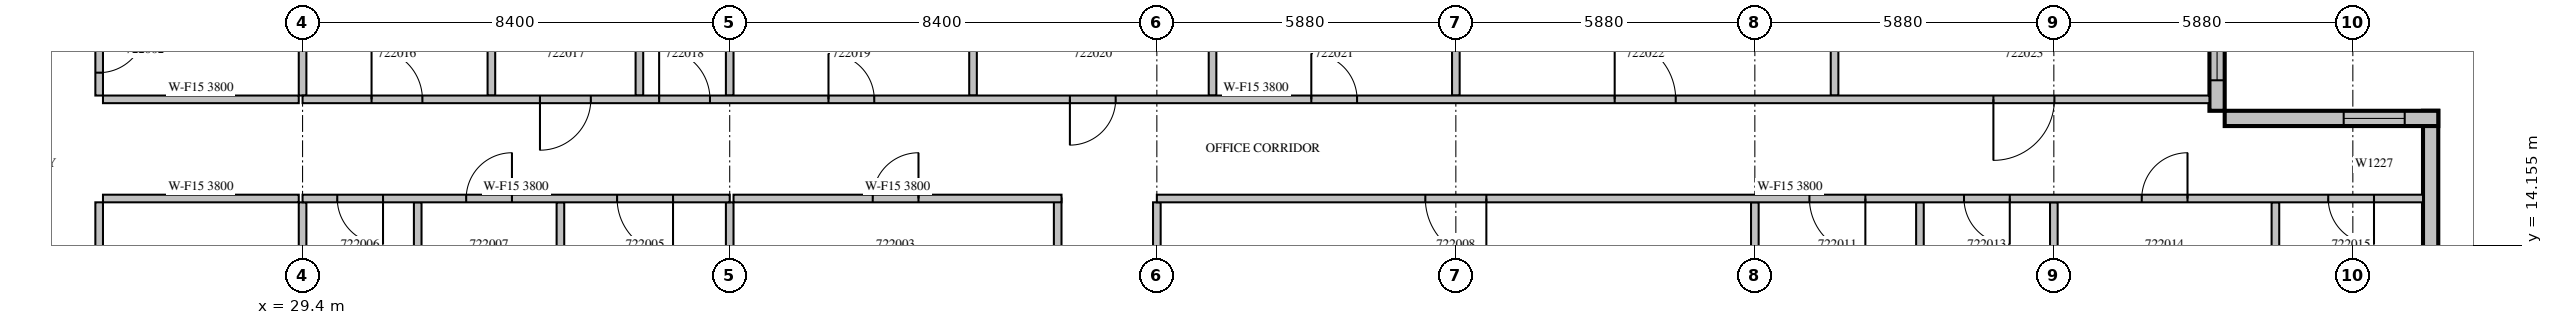
"""IFC4 building model, lengths in metres.
Left out: names, types, materials, properties, quantities, classifications, styles, units other than length and angle.
Written with IfcOpenShell. Run it as: python <this file> out.ifc"""

import sys

from ifc_helpers import new_model, si_unit, direction, frame, frame_2d, origin, place, context, subcontext, project, spatial, rectangle, extrude, source, transform, mapped, element, fill, save


model = new_model("IFC4")
c1 = context("Model", 3, precision=1e-05, world=origin(), true_north=direction((0.0, 1.0)))
c2 = subcontext(c1, "Body", "Model", "MODEL_VIEW")
j1 = project(units=[si_unit("LENGTHUNIT", "METRE"), si_unit("PLANEANGLEUNIT", "RADIAN")], contexts=[c1])
p1 = place(None, origin())
s1 = spatial("IfcSite", under=j1, at=p1, CompositionType="ELEMENT")
p2 = place(p1, origin())
s2 = spatial("IfcBuilding", under=s1, at=p2, CompositionType="ELEMENT")
p3 = place(p2, frame((0.0, 0.0, 103.5)))
s3 = spatial("IfcBuildingStorey", under=s2, at=p3, CompositionType="ELEMENT", Elevation=103.5)
m1 = source(origin(), c2, "Body", "SweptSolid", [
    extrude(rectangle(XDim=6.3, YDim=0.3, at=frame_2d((3.15, 0.0))), origin(), (0.0, 0.0, 1.0), 3.8),
])
p4 = place(p3, frame((71.25, 10.5, 0.0), z_axis=(0.0, 0.0, 1.0), x_axis=(0.0, 1.0, 0.0)))
e1 = element("IfcWall", 1, at=p4, inside=s3, PredefinedType="STANDARD", context=c2, shape_type="MappedRepresentation", body=[
    mapped(m1, transform((0.0, 0.0, 0.0), scale=1.0)),
])
m2 = source(origin(), c2, "Body", "SweptSolid", [
    extrude(rectangle(XDim=1.2, YDim=2.7, at=frame_2d((0.6, 1.35))), frame((0.0, 0.16, 0.0), z_axis=(0.0, -1.0, 0.0), x_axis=(1.0, 0.0, 0.0)), (0.0, 0.0, 1.0), 0.32),
])
p5 = place(p4, frame((1.025, 0.0, 0.6)))
e2 = element("IfcOpeningElement", 2, at=p5, cuts=e1, PredefinedType="OPENING", context=c2, shape_type="MappedRepresentation", body=[
    mapped(m2, transform((0.0, 0.0, 0.0), scale=1.0)),
])
m3 = source(origin(), c2, "Body", "SweptSolid", [
    extrude(rectangle(XDim=4.2, YDim=0.3, at=frame_2d((2.1, 0.0))), origin(), (0.0, 0.0, 1.0), 3.8),
])
p6 = place(p3, frame((71.4, 16.65, 0.0), z_axis=(0.0, 0.0, 1.0), x_axis=(-1.0, 0.0, 0.0)))
e3 = element("IfcWall", 3, at=p6, inside=s3, PredefinedType="STANDARD", context=c2, shape_type="MappedRepresentation", body=[
    mapped(m3, transform((0.0, 0.0, 0.0), scale=1.0)),
])
p7 = place(p6, frame((0.66, 0.0, 0.6)))
e4 = element("IfcOpeningElement", 4, at=p7, cuts=e3, PredefinedType="OPENING", context=c2, shape_type="MappedRepresentation", body=[
    mapped(m2, transform((0.0, 0.0, 0.0), scale=1.0)),
])
p8 = place(p3, frame((67.05, 16.8, 0.0), z_axis=(0.0, 0.0, 1.0), x_axis=(0.0, 1.0, 0.0)))
e5 = element("IfcWall", 5, at=p8, inside=s3, PredefinedType="STANDARD", context=c2, shape_type="MappedRepresentation", body=[
    mapped(m3, transform((0.0, 0.0, 0.0), scale=1.0)),
])
m4 = source(origin(), c2, "Body", "SweptSolid", [
    extrude(rectangle(XDim=3.0, YDim=2.7, at=frame_2d((1.5, 1.35))), frame((0.0, 0.16, 0.0), z_axis=(0.0, -1.0, 0.0), x_axis=(1.0, 0.0, 0.0)), (0.0, 0.0, 1.0), 0.32),
])
p9 = place(p8, frame((0.6, 0.0, 0.6)))
e6 = element("IfcOpeningElement", 6, at=p9, cuts=e5, PredefinedType="OPENING", context=c2, shape_type="MappedRepresentation", body=[
    mapped(m4, transform((0.0, 0.0, 0.0), scale=1.0)),
])
m5 = source(origin(), c2, "Body", "SweptSolid", [
    extrude(rectangle(XDim=4.295, YDim=0.15, at=frame_2d((2.147, 0.0))), origin(), (0.0, 0.0, 1.0), 3.8),
])
p10 = place(p3, frame((25.4, 15.0, 0.0), z_axis=(0.0, 0.0, 1.0), x_axis=(0.0, -1.0, 0.0)))
e7 = element("IfcWall", 7, at=p10, inside=s3, PredefinedType="PARTITIONING", context=c2, shape_type="MappedRepresentation", body=[
    mapped(m5, transform((0.0, 0.0, 0.0), scale=1.0)),
])
m6 = source(origin(), c2, "Body", "SweptSolid", [
    extrude(rectangle(XDim=0.9, YDim=2.1, at=frame_2d((0.45, 1.05))), frame((0.0, 0.085, 0.0), z_axis=(0.0, -1.0, 0.0), x_axis=(1.0, 0.0, 0.0)), (0.0, 0.0, 1.0), 0.17),
])
p11 = place(p10, frame((1.113, 0.0, 0.0)))
e8 = element("IfcOpeningElement", 8, at=p11, cuts=e7, PredefinedType="OPENING", context=c2, shape_type="MappedRepresentation", body=[
    mapped(m6, transform((0.0, 0.0, 0.0), scale=1.0)),
])
m7 = source(origin(), c2, "Body", "SweptSolid", [
    extrude(rectangle(XDim=3.6, YDim=0.15, at=frame_2d((1.8, 0.0))), origin(), (0.0, 0.0, 1.0), 3.8),
])
p12 = place(p3, frame((25.4, 20.7, 0.0), z_axis=(0.0, 0.0, 1.0), x_axis=(0.0, -1.0, 0.0)))
e9 = element("IfcWall", 9, at=p12, inside=s3, PredefinedType="PARTITIONING", context=c2, shape_type="MappedRepresentation", body=[
    mapped(m7, transform((0.0, 0.0, 0.0), scale=1.0)),
])
p13 = place(p12, frame((2.25, 0.0, 0.0)))
e10 = element("IfcOpeningElement", 10, at=p13, cuts=e9, PredefinedType="OPENING", context=c2, shape_type="MappedRepresentation", body=[
    mapped(m6, transform((0.0, 0.0, 0.0), scale=1.0)),
])
p14 = place(p3, frame((29.325, 15.075, 0.0), z_axis=(0.0, 0.0, 1.0), x_axis=(-1.0, 0.0, 0.0)))
e11 = element("IfcWall", 11, at=p14, inside=s3, PredefinedType="PARTITIONING", context=c2, shape_type="SweptSolid", body=[
    extrude(rectangle(XDim=3.85, YDim=0.15, at=frame_2d((1.925, 0.0))), origin(), (0.0, 0.0, 1.0), 3.8),
])
m8 = source(origin(), c2, "Body", "SweptSolid", [
    extrude(rectangle(XDim=3.85, YDim=0.15, at=frame_2d((1.925, 0.0))), origin(), (0.0, 0.0, 1.0), 3.8),
])
p15 = place(p3, frame((25.475, 17.025, 0.0), z_axis=(0.0, 0.0, 1.0), x_axis=(1.0, 0.0, 0.0)))
e12 = element("IfcWall", 12, at=p15, inside=s3, PredefinedType="PARTITIONING", context=c2, shape_type="MappedRepresentation", body=[
    mapped(m8, transform((0.0, 0.0, 0.0), scale=1.0)),
])
p16 = place(p3, frame((29.4, 11.024, 0.0), z_axis=(0.0, 0.0, 1.0), x_axis=(0.0, 1.0, 0.0)))
e13 = element("IfcWall", 13, at=p16, inside=s3, PredefinedType="PARTITIONING", context=c2, shape_type="SweptSolid", body=[
    extrude(rectangle(XDim=3.976, YDim=0.15, at=frame_2d((1.988, 0.0))), origin(), (0.0, 0.0, 1.0), 3.8),
])
p17 = place(p3, frame((29.4, 17.1, 0.0), z_axis=(0.0, 0.0, 1.0), x_axis=(0.0, 1.0, 0.0)))
e14 = element("IfcWall", 14, at=p17, inside=s3, PredefinedType="PARTITIONING", context=c2, shape_type="SweptSolid", body=[
    extrude(rectangle(XDim=2.851, YDim=0.15, at=frame_2d((1.425, 0.0))), origin(), (0.0, 0.0, 1.0), 3.8),
])
m9 = source(origin(), c2, "Body", "SweptSolid", [
    extrude(rectangle(XDim=2.775, YDim=0.15, at=frame_2d((1.387, 0.0))), origin(), (0.0, 0.0, 1.0), 3.8),
])
p18 = place(p3, frame((44.25, 12.3, 0.0), z_axis=(0.0, 0.0, 1.0), x_axis=(0.0, 1.0, 0.0)))
e15 = element("IfcWall", 15, at=p18, inside=s3, PredefinedType="PARTITIONING", context=c2, shape_type="MappedRepresentation", body=[
    mapped(m9, transform((0.0, 0.0, 0.0), scale=1.0)),
])
m10 = source(origin(), c2, "Body", "SweptSolid", [
    extrude(rectangle(XDim=6.45, YDim=0.15, at=frame_2d((3.225, 0.0))), origin(), (0.0, 0.0, 1.0), 3.8),
])
p19 = place(p3, frame((44.325, 15.075, 0.0), z_axis=(0.0, 0.0, 1.0), x_axis=(-1.0, 0.0, 0.0)))
e16 = element("IfcWall", 16, at=p19, inside=s3, PredefinedType="PARTITIONING", context=c2, shape_type="MappedRepresentation", body=[
    mapped(m10, transform((0.0, 0.0, 0.0), scale=1.0)),
])
p20 = place(p19, frame((2.812, 0.0, 0.0)))
e17 = element("IfcOpeningElement", 17, at=p20, cuts=e16, PredefinedType="OPENING", context=c2, shape_type="MappedRepresentation", body=[
    mapped(m6, transform((0.0, 0.0, 0.0), scale=1.0)),
])
for number, where, z_axis, x_axis in (
    (18, (31.665, 10.705, 0.0), (0.0, 0.0, 1.0), (0.0, 1.0, 0.0)),
    (19, (34.471, 10.705, 0.0), (0.0, 0.0, 1.0), (0.0, 1.0, 0.0)),
):
    element("IfcWall", number, at=place(p3, frame(where, z_axis=z_axis, x_axis=x_axis)), inside=s3, PredefinedType="PARTITIONING", context=c2, shape_type="MappedRepresentation", body=[
        mapped(m5, transform((0.0, 0.0, 0.0), scale=1.0)),
    ])
m11 = source(origin(), c2, "Body", "SweptSolid", [
    extrude(rectangle(XDim=3.976, YDim=0.15, at=frame_2d((1.988, 0.0))), origin(), (0.0, 0.0, 1.0), 3.8),
])
p21 = place(p3, frame((37.8, 11.024, 0.0), z_axis=(0.0, 0.0, 1.0), x_axis=(0.0, 1.0, 0.0)))
e20 = element("IfcWall", 20, at=p21, inside=s3, PredefinedType="PARTITIONING", context=c2, shape_type="MappedRepresentation", body=[
    mapped(m11, transform((0.0, 0.0, 0.0), scale=1.0)),
])
p22 = place(p3, frame((61.207, 11.175, 0.0), z_axis=(0.0, 0.0, 1.0), x_axis=(0.0, 1.0, 0.0)))
e21 = element("IfcWall", 21, at=p22, inside=s3, PredefinedType="PARTITIONING", context=c2, shape_type="SweptSolid", body=[
    extrude(rectangle(XDim=3.825, YDim=0.15, at=frame_2d((1.913, 0.0))), origin(), (0.0, 0.0, 1.0), 3.8),
])
m12 = source(origin(), c2, "Body", "SweptSolid", [
    extrude(rectangle(XDim=3.825, YDim=0.15, at=frame_2d((1.913, 0.0))), origin(), (0.0, 0.0, 1.0), 3.8),
])
for number, where, z_axis, x_axis in (
    (22, (63.84, 11.175, 0.0), (0.0, 0.0, 1.0), (0.0, 1.0, 0.0)),
    (23, (68.197, 11.175, 0.0), (0.0, 0.0, 1.0), (0.0, 1.0, 0.0)),
    (24, (46.2, 11.175, 0.0), (0.0, 0.0, 1.0), (0.0, 1.0, 0.0)),
    (25, (57.96, 11.175, 0.0), (0.0, 0.0, 1.0), (0.0, 1.0, 0.0)),
):
    element("IfcWall", number, at=place(p3, frame(where, z_axis=z_axis, x_axis=x_axis)), inside=s3, PredefinedType="PARTITIONING", context=c2, shape_type="MappedRepresentation", body=[
        mapped(m12, transform((0.0, 0.0, 0.0), scale=1.0)),
    ])
for number, where, z_axis, x_axis in (
    (26, (33.113, 20.7, 0.0), (0.0, 0.0, 1.0), (0.0, -1.0, 0.0)),
    (27, (36.024, 20.7, 0.0), (0.0, 0.0, 1.0), (0.0, -1.0, 0.0)),
    (28, (42.585, 20.7, 0.0), (0.0, 0.0, 1.0), (0.0, -1.0, 0.0)),
    (29, (47.295, 20.7, 0.0), (0.0, 0.0, 1.0), (0.0, -1.0, 0.0)),
    (30, (59.528, 20.7, 0.0), (0.0, 0.0, 1.0), (0.0, -1.0, 0.0)),
):
    element("IfcWall", number, at=place(p3, frame(where, z_axis=z_axis, x_axis=x_axis)), inside=s3, PredefinedType="PARTITIONING", context=c2, shape_type="MappedRepresentation", body=[
        mapped(m7, transform((0.0, 0.0, 0.0), scale=1.0)),
    ])
m13 = source(origin(), c2, "Body", "SweptSolid", [
    extrude(rectangle(XDim=2.851, YDim=0.15, at=frame_2d((1.425, 0.0))), origin(), (0.0, 0.0, 1.0), 3.8),
])
for number, where, z_axis, x_axis in (
    (31, (37.8, 17.1, 0.0), (0.0, 0.0, 1.0), (0.0, 1.0, 0.0)),
    (32, (52.08, 17.1, 0.0), (0.0, 0.0, 1.0), (0.0, 1.0, 0.0)),
):
    element("IfcWall", number, at=place(p3, frame(where, z_axis=z_axis, x_axis=x_axis)), inside=s3, PredefinedType="PARTITIONING", context=c2, shape_type="MappedRepresentation", body=[
        mapped(m13, transform((0.0, 0.0, 0.0), scale=1.0)),
    ])
m14 = source(origin(), c2, "Body", "SweptSolid", [
    extrude(rectangle(XDim=8.4, YDim=0.15, at=frame_2d((4.2, 0.0))), origin(), (0.0, 0.0, 1.0), 3.8),
])
p23 = place(p3, frame((37.8, 15.075, 0.0), z_axis=(0.0, 0.0, 1.0), x_axis=(-1.0, 0.0, 0.0)))
e33 = element("IfcWall", 33, at=p23, inside=s3, PredefinedType="PARTITIONING", context=c2, shape_type="MappedRepresentation", body=[
    mapped(m14, transform((0.0, 0.0, 0.0), scale=1.0)),
])
m15 = source(origin(), c2, "Body", "SweptSolid", [
    extrude(rectangle(XDim=1.1, YDim=2.1, at=frame_2d((0.55, 1.05))), frame((0.0, 0.085, 0.0), z_axis=(0.0, -1.0, 0.0), x_axis=(1.0, 0.0, 0.0)), (0.0, 0.0, 1.0), 0.17),
])
p24 = place(p23, frame((1.115, 0.0, 0.0)))
e34 = element("IfcOpeningElement", 34, at=p24, cuts=e33, PredefinedType="OPENING", context=c2, shape_type="MappedRepresentation", body=[
    mapped(m15, transform((0.0, 0.0, 0.0), scale=1.0)),
])
p25 = place(p23, frame((6.818, 0.0, 0.0)))
e35 = element("IfcOpeningElement", 35, at=p25, cuts=e33, PredefinedType="OPENING", context=c2, shape_type="MappedRepresentation", body=[
    mapped(m6, transform((0.0, 0.0, 0.0), scale=1.0)),
])
p26 = place(p23, frame((4.282, 0.0, 0.0)))
e36 = element("IfcOpeningElement", 36, at=p26, cuts=e33, PredefinedType="OPENING", context=c2, shape_type="MappedRepresentation", body=[
    mapped(m6, transform((0.0, 0.0, 0.0), scale=1.0)),
])
m16 = source(origin(), c2, "Body", "SweptSolid", [
    extrude(rectangle(XDim=24.9, YDim=0.15, at=frame_2d((12.45, 0.0))), origin(), (0.0, 0.0, 1.0), 3.8),
])
p27 = place(p3, frame((71.1, 15.075, 0.0), z_axis=(0.0, 0.0, 1.0), x_axis=(-1.0, 0.0, 0.0)))
e37 = element("IfcWall", 37, at=p27, inside=s3, PredefinedType="PARTITIONING", context=c2, shape_type="MappedRepresentation", body=[
    mapped(m16, transform((0.0, 0.0, 0.0), scale=1.0)),
])
m17 = source(origin(), c2, "Body", "SweptSolid", [
    extrude(rectangle(XDim=1.2, YDim=2.1, at=frame_2d((0.6, 1.05))), frame((0.0, 0.085, 0.0), z_axis=(0.0, -1.0, 0.0), x_axis=(1.0, 0.0, 0.0)), (0.0, 0.0, 1.0), 0.17),
])
p28 = place(p27, frame((18.42, 0.0, 0.0)))
e38 = element("IfcOpeningElement", 38, at=p28, cuts=e37, PredefinedType="OPENING", context=c2, shape_type="MappedRepresentation", body=[
    mapped(m17, transform((0.0, 0.0, 0.0), scale=1.0)),
])
p29 = place(p27, frame((10.967, 0.0, 0.0)))
e39 = element("IfcOpeningElement", 39, at=p29, cuts=e37, PredefinedType="OPENING", context=c2, shape_type="MappedRepresentation", body=[
    mapped(m15, transform((0.0, 0.0, 0.0), scale=1.0)),
])
p30 = place(p27, frame((8.127, 0.0, 0.0)))
e40 = element("IfcOpeningElement", 40, at=p30, cuts=e37, PredefinedType="OPENING", context=c2, shape_type="MappedRepresentation", body=[
    mapped(m6, transform((0.0, 0.0, 0.0), scale=1.0)),
])
p31 = place(p27, frame((4.631, 0.0, 0.0)))
e41 = element("IfcOpeningElement", 41, at=p31, cuts=e37, PredefinedType="OPENING", context=c2, shape_type="MappedRepresentation", body=[
    mapped(m6, transform((0.0, 0.0, 0.0), scale=1.0)),
])
p32 = place(p27, frame((0.964, 0.0, 0.0)))
e42 = element("IfcOpeningElement", 42, at=p32, cuts=e37, PredefinedType="OPENING", context=c2, shape_type="MappedRepresentation", body=[
    mapped(m6, transform((0.0, 0.0, 0.0), scale=1.0)),
])
m18 = source(origin(), c2, "Body", "SweptSolid", [
    extrude(rectangle(XDim=37.5, YDim=0.15, at=frame_2d((18.75, 0.0))), origin(), (0.0, 0.0, 1.0), 3.8),
])
p33 = place(p3, frame((29.4, 17.025, 0.0), z_axis=(0.0, 0.0, 1.0), x_axis=(1.0, 0.0, 0.0)))
e43 = element("IfcWall", 43, at=p33, inside=s3, PredefinedType="PARTITIONING", context=c2, shape_type="MappedRepresentation", body=[
    mapped(m18, transform((0.0, 0.0, 0.0), scale=1.0)),
])
m19 = source(origin(), c2, "Body", "SweptSolid", [
    extrude(rectangle(XDim=1.0, YDim=2.1, at=frame_2d((0.5, 1.05))), frame((0.0, 0.085, 0.0), z_axis=(0.0, -1.0, 0.0), x_axis=(1.0, 0.0, 0.0)), (0.0, 0.0, 1.0), 0.17),
])
p34 = place(p33, frame((1.357, 0.0, 0.0)))
e44 = element("IfcOpeningElement", 44, at=p34, cuts=e43, PredefinedType="OPENING", context=c2, shape_type="MappedRepresentation", body=[
    mapped(m19, transform((0.0, 0.0, 0.0), scale=1.0)),
])
p35 = place(p33, frame((4.669, 0.0, 0.0)))
e45 = element("IfcOpeningElement", 45, at=p35, cuts=e43, PredefinedType="OPENING", context=c2, shape_type="MappedRepresentation", body=[
    mapped(m19, transform((0.0, 0.0, 0.0), scale=1.0)),
])
p36 = place(p33, frame((7.012, 0.0, 0.0)))
e46 = element("IfcOpeningElement", 46, at=p36, cuts=e43, PredefinedType="OPENING", context=c2, shape_type="MappedRepresentation", body=[
    mapped(m19, transform((0.0, 0.0, 0.0), scale=1.0)),
])
p37 = place(p33, frame((10.342, 0.0, 0.0)))
e47 = element("IfcOpeningElement", 47, at=p37, cuts=e43, PredefinedType="OPENING", context=c2, shape_type="MappedRepresentation", body=[
    mapped(m6, transform((0.0, 0.0, 0.0), scale=1.0)),
])
p38 = place(p33, frame((15.09, 0.0, 0.0)))
e48 = element("IfcOpeningElement", 48, at=p38, cuts=e43, PredefinedType="OPENING", context=c2, shape_type="MappedRepresentation", body=[
    mapped(m6, transform((0.0, 0.0, 0.0), scale=1.0)),
])
p39 = place(p33, frame((19.837, 0.0, 0.0)))
e49 = element("IfcOpeningElement", 49, at=p39, cuts=e43, PredefinedType="OPENING", context=c2, shape_type="MappedRepresentation", body=[
    mapped(m6, transform((0.0, 0.0, 0.0), scale=1.0)),
])
p40 = place(p33, frame((25.804, 0.0, 0.0)))
e50 = element("IfcOpeningElement", 50, at=p40, cuts=e43, PredefinedType="OPENING", context=c2, shape_type="MappedRepresentation", body=[
    mapped(m17, transform((0.0, 0.0, 0.0), scale=1.0)),
])
p41 = place(p33, frame((33.251, 0.0, 0.0)))
e51 = element("IfcOpeningElement", 51, at=p41, cuts=e43, PredefinedType="OPENING", context=c2, shape_type="MappedRepresentation", body=[
    mapped(m17, transform((0.0, 0.0, 0.0), scale=1.0)),
])
m20 = source(origin(), c2, "Body", "SweptSolid", [
    extrude(rectangle(XDim=1.2, YDim=2.7, at=frame_2d((0.6, 1.35))), frame((0.0, 0.03, 0.0), z_axis=(0.0, -1.0, 0.0), x_axis=(1.0, 0.0, 0.0)), (0.0, 0.0, 1.0), 0.06),
])
p42 = place(p7, origin())
e52 = element("IfcWindow", 52, at=p42, inside=s3, PartitioningType="SINGLE_PANEL", PredefinedType="WINDOW", context=c2, shape_type="MappedRepresentation", body=[
    mapped(m20, transform((0.0, 0.0, 0.0), scale=1.0)),
])
fill(e4, e52)
m21 = source(origin(), c2, "Body", "SweptSolid", [
    extrude(rectangle(XDim=3.0, YDim=2.7, at=frame_2d((1.5, 1.35))), frame((0.0, 0.03, 0.0), z_axis=(0.0, -1.0, 0.0), x_axis=(1.0, 0.0, 0.0)), (0.0, 0.0, 1.0), 0.06),
])
p43 = place(p9, origin())
e53 = element("IfcWindow", 53, at=p43, inside=s3, PartitioningType="SINGLE_PANEL", PredefinedType="WINDOW", context=c2, shape_type="MappedRepresentation", body=[
    mapped(m21, transform((0.0, 0.0, 0.0), scale=1.0)),
])
fill(e6, e53)
m22 = source(origin(), c2, "Body", "SweptSolid", [
    extrude(rectangle(XDim=0.9, YDim=2.1, at=frame_2d((0.45, 1.05))), frame((0.0, 0.025, 0.0), z_axis=(0.0, -1.0, 0.0), x_axis=(1.0, 0.0, 0.0)), (0.0, 0.0, 1.0), 0.05),
])
p44 = place(p13, origin())
e54 = element("IfcDoor", 54, at=p44, inside=s3, OperationType="SINGLE_SWING_LEFT", PredefinedType="DOOR", context=c2, shape_type="MappedRepresentation", body=[
    mapped(m22, transform((0.0, 0.0, 0.0), scale=1.0)),
])
fill(e10, e54)
p45 = place(p20, origin())
e55 = element("IfcDoor", 55, at=p45, inside=s3, OperationType="SINGLE_SWING_RIGHT", PredefinedType="DOOR", context=c2, shape_type="MappedRepresentation", body=[
    mapped(m22, transform((0.0, 0.0, 0.0), scale=1.0)),
])
fill(e17, e55)
m23 = source(origin(), c2, "Body", "SweptSolid", [
    extrude(rectangle(XDim=1.1, YDim=2.1, at=frame_2d((0.55, 1.05))), frame((0.0, 0.025, 0.0), z_axis=(0.0, -1.0, 0.0), x_axis=(1.0, 0.0, 0.0)), (0.0, 0.0, 1.0), 0.05),
])
p46 = place(p24, origin())
e56 = element("IfcDoor", 56, at=p46, inside=s3, OperationType="SINGLE_SWING_LEFT", PredefinedType="DOOR", context=c2, shape_type="MappedRepresentation", body=[
    mapped(m23, transform((0.0, 0.0, 0.0), scale=1.0)),
])
fill(e34, e56)
p47 = place(p25, origin())
e57 = element("IfcDoor", 57, at=p47, inside=s3, OperationType="SINGLE_SWING_LEFT", PredefinedType="DOOR", context=c2, shape_type="MappedRepresentation", body=[
    mapped(m22, transform((0.0, 0.0, 0.0), scale=1.0)),
])
fill(e35, e57)
p48 = place(p26, origin())
e58 = element("IfcDoor", 58, at=p48, inside=s3, OperationType="SINGLE_SWING_RIGHT", PredefinedType="DOOR", context=c2, shape_type="MappedRepresentation", body=[
    mapped(m22, transform((0.0, 0.0, 0.0), scale=1.0)),
])
fill(e36, e58)
m24 = source(origin(), c2, "Body", "SweptSolid", [
    extrude(rectangle(XDim=1.2, YDim=2.1, at=frame_2d((0.6, 1.05))), frame((0.0, 0.025, 0.0), z_axis=(0.0, -1.0, 0.0), x_axis=(1.0, 0.0, 0.0)), (0.0, 0.0, 1.0), 0.05),
])
p49 = place(p28, origin())
e59 = element("IfcDoor", 59, at=p49, inside=s3, OperationType="SINGLE_SWING_LEFT", PredefinedType="DOOR", context=c2, shape_type="MappedRepresentation", body=[
    mapped(m24, transform((0.0, 0.0, 0.0), scale=1.0)),
])
fill(e38, e59)
p50 = place(p29, origin())
e60 = element("IfcDoor", 60, at=p50, inside=s3, OperationType="SINGLE_SWING_LEFT", PredefinedType="DOOR", context=c2, shape_type="MappedRepresentation", body=[
    mapped(m23, transform((0.0, 0.0, 0.0), scale=1.0)),
])
fill(e39, e60)
p51 = place(p30, origin())
e61 = element("IfcDoor", 61, at=p51, inside=s3, OperationType="SINGLE_SWING_LEFT", PredefinedType="DOOR", context=c2, shape_type="MappedRepresentation", body=[
    mapped(m22, transform((0.0, 0.0, 0.0), scale=1.0)),
])
fill(e40, e61)
p52 = place(p31, origin())
e62 = element("IfcDoor", 62, at=p52, inside=s3, OperationType="SINGLE_SWING_RIGHT", PredefinedType="DOOR", context=c2, shape_type="MappedRepresentation", body=[
    mapped(m22, transform((0.0, 0.0, 0.0), scale=1.0)),
])
fill(e41, e62)
p53 = place(p32, origin())
e63 = element("IfcDoor", 63, at=p53, inside=s3, OperationType="SINGLE_SWING_LEFT", PredefinedType="DOOR", context=c2, shape_type="MappedRepresentation", body=[
    mapped(m22, transform((0.0, 0.0, 0.0), scale=1.0)),
])
fill(e42, e63)
m25 = source(origin(), c2, "Body", "SweptSolid", [
    extrude(rectangle(XDim=1.0, YDim=2.1, at=frame_2d((0.5, 1.05))), frame((0.0, 0.025, 0.0), z_axis=(0.0, -1.0, 0.0), x_axis=(1.0, 0.0, 0.0)), (0.0, 0.0, 1.0), 0.05),
])
p54 = place(p34, origin())
e64 = element("IfcDoor", 64, at=p54, inside=s3, OperationType="SINGLE_SWING_LEFT", PredefinedType="DOOR", context=c2, shape_type="MappedRepresentation", body=[
    mapped(m25, transform((0.0, 0.0, 0.0), scale=1.0)),
])
fill(e44, e64)
p55 = place(p35, origin())
e65 = element("IfcDoor", 65, at=p55, inside=s3, OperationType="SINGLE_SWING_RIGHT", PredefinedType="DOOR", context=c2, shape_type="MappedRepresentation", body=[
    mapped(m25, transform((0.0, 0.0, 0.0), scale=1.0)),
])
fill(e45, e65)
p56 = place(p36, origin())
e66 = element("IfcDoor", 66, at=p56, inside=s3, OperationType="SINGLE_SWING_LEFT", PredefinedType="DOOR", context=c2, shape_type="MappedRepresentation", body=[
    mapped(m25, transform((0.0, 0.0, 0.0), scale=1.0)),
])
fill(e46, e66)
p57 = place(p37, origin())
e67 = element("IfcDoor", 67, at=p57, inside=s3, OperationType="SINGLE_SWING_LEFT", PredefinedType="DOOR", context=c2, shape_type="MappedRepresentation", body=[
    mapped(m22, transform((0.0, 0.0, 0.0), scale=1.0)),
])
fill(e47, e67)
p58 = place(p38, origin())
e68 = element("IfcDoor", 68, at=p58, inside=s3, OperationType="SINGLE_SWING_RIGHT", PredefinedType="DOOR", context=c2, shape_type="MappedRepresentation", body=[
    mapped(m22, transform((0.0, 0.0, 0.0), scale=1.0)),
])
fill(e48, e68)
p59 = place(p39, origin())
e69 = element("IfcDoor", 69, at=p59, inside=s3, OperationType="SINGLE_SWING_LEFT", PredefinedType="DOOR", context=c2, shape_type="MappedRepresentation", body=[
    mapped(m22, transform((0.0, 0.0, 0.0), scale=1.0)),
])
fill(e49, e69)
p60 = place(p40, origin())
e70 = element("IfcDoor", 70, at=p60, inside=s3, OperationType="SINGLE_SWING_LEFT", PredefinedType="DOOR", context=c2, shape_type="MappedRepresentation", body=[
    mapped(m24, transform((0.0, 0.0, 0.0), scale=1.0)),
])
fill(e50, e70)
p61 = place(p41, origin())
e71 = element("IfcDoor", 71, at=p61, inside=s3, OperationType="SINGLE_SWING_RIGHT", PredefinedType="DOOR", context=c2, shape_type="MappedRepresentation", body=[
    mapped(m24, transform((0.0, 0.0, 0.0), scale=1.0)),
])
fill(e51, e71)
save(model, sys.argv[1])
